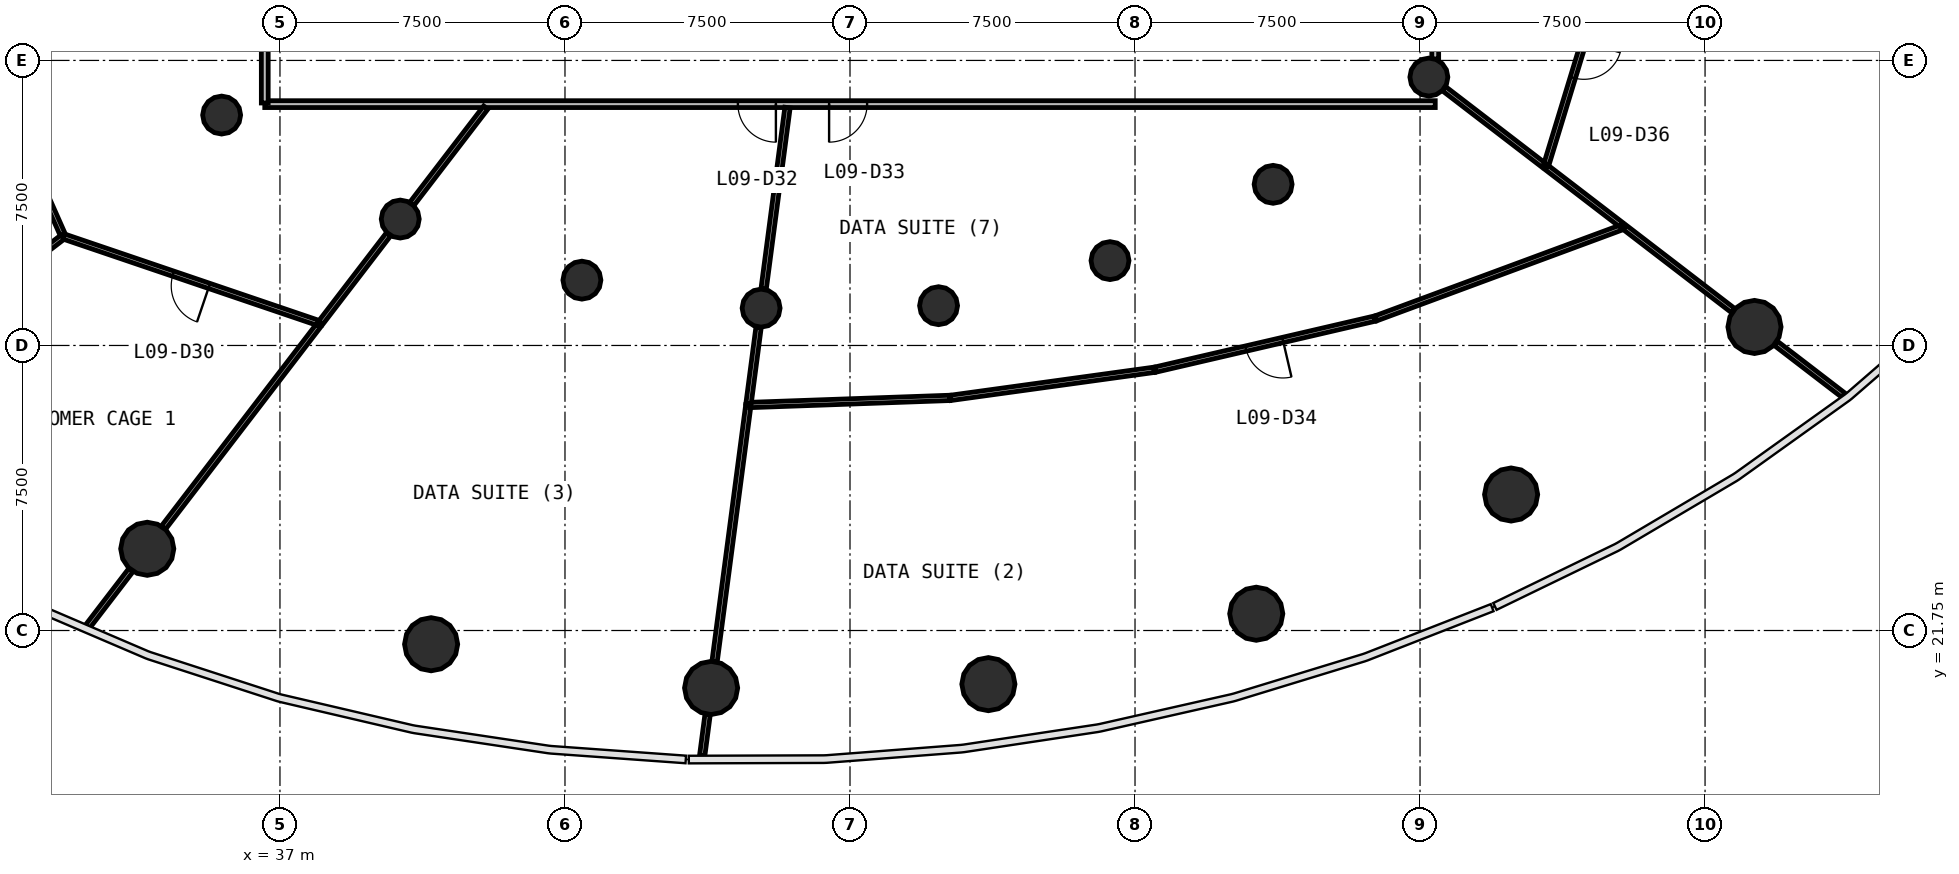
"""IFC4 building model, lengths in metres.
Left out: names, types, materials, properties, quantities, classifications, styles, units other than length and angle.
Written with IfcOpenShell. Run it as: python <this file> out.ifc"""

import sys

from ifc_helpers import new_model, si_unit, direction, frame, frame_2d, origin, origin_2d, place, context, subcontext, project, spatial, rectangle, circle, extrude, source, transform, mapped, element, fill, save


model = new_model("IFC4")
c1 = context("Model", 3, precision=1e-05, world=origin(), true_north=direction((0.0, 1.0)))
c2 = subcontext(c1, "Body", "Model", "MODEL_VIEW")
j1 = project(units=[si_unit("LENGTHUNIT", "METRE"), si_unit("PLANEANGLEUNIT", "RADIAN")], contexts=[c1])
p1 = place(None, origin())
s1 = spatial("IfcSite", under=j1, at=p1, CompositionType="ELEMENT")
p2 = place(p1, origin())
s2 = spatial("IfcBuilding", under=s1, at=p2, CompositionType="ELEMENT")
p3 = place(p2, frame((0.0, 0.0, 40.2)))
s3 = spatial("IfcBuildingStorey", under=s2, at=p3, CompositionType="ELEMENT", Elevation=40.2)
m1 = source(origin(), c2, "Body", "SweptSolid", [
    extrude(circle(Radius=0.7, at=origin_2d()), origin(), (0.0, 0.0, 1.0), 4.4),
])
for number, where, z_axis, x_axis in (
    (1, (33.508, 23.9, 0.0), (0.0, 0.0, 1.0), (1.0, 0.0, 0.0)),
    (2, (40.977, 21.389, 0.0), (0.0, 0.0, 1.0), (1.0, 0.0, 0.0)),
    (3, (48.345, 20.239, 0.0), (0.0, 0.0, 1.0), (1.0, 0.0, 0.0)),
    (4, (55.642, 20.339, 0.0), (0.0, 0.0, 1.0), (1.0, 0.0, 0.0)),
    (5, (62.69, 22.191, 0.0), (0.0, 0.0, 1.0), (1.0, 0.0, 0.0)),
    (6, (69.396, 25.328, 0.0), (0.0, 0.0, 1.0), (1.0, 0.0, 0.0)),
    (7, (75.801, 29.737, 0.0), (0.0, 0.0, 1.0), (1.0, 0.0, 0.0)),
):
    element("IfcColumn", number, at=place(p3, frame(where, z_axis=z_axis, x_axis=x_axis)), inside=s3, PredefinedType="COLUMN", context=c2, shape_type="MappedRepresentation", body=[
        mapped(m1, transform((0.0, 0.0, 0.0), scale=1.0)),
    ])
m2 = source(origin(), c2, "Body", "SweptSolid", [
    extrude(circle(Radius=0.5, at=origin_2d()), origin(), (0.0, 0.0, 1.0), 4.4),
])
for number, where, z_axis, x_axis in (
    (8, (35.465, 35.312, 0.0), (0.0, 0.0, 1.0), (1.0, 0.0, 0.0)),
    (9, (40.165, 32.576, 0.0), (0.0, 0.0, 1.0), (1.0, 0.0, 0.0)),
    (10, (44.945, 30.969, 0.0), (0.0, 0.0, 1.0), (1.0, 0.0, 0.0)),
    (11, (49.661, 30.233, 0.0), (0.0, 0.0, 1.0), (1.0, 0.0, 0.0)),
    (12, (54.331, 30.297, 0.0), (0.0, 0.0, 1.0), (1.0, 0.0, 0.0)),
    (13, (58.842, 31.482, 0.0), (0.0, 0.0, 1.0), (1.0, 0.0, 0.0)),
    (14, (63.134, 33.49, 0.0), (0.0, 0.0, 1.0), (1.0, 0.0, 0.0)),
    (15, (67.232, 36.312, 0.0), (0.0, 0.0, 1.0), (1.0, 0.0, 0.0)),
):
    element("IfcColumn", number, at=place(p3, frame(where, z_axis=z_axis, x_axis=x_axis)), inside=s3, PredefinedType="COLUMN", context=c2, shape_type="MappedRepresentation", body=[
        mapped(m2, transform((0.0, 0.0, 0.0), scale=1.0)),
    ])
p4 = place(p3, frame((67.4, 35.6, 0.0), z_axis=(0.0, 0.0, 1.0), x_axis=(-1.0, 0.0, 0.0)))
e16 = element("IfcWall", 16, at=p4, inside=s3, PredefinedType="PARTITIONING", context=c2, shape_type="SweptSolid", body=[
    extrude(rectangle(XDim=30.8, YDim=0.18, at=frame_2d((15.4, 0.0))), origin(), (0.0, 0.0, 1.0), 3.05),
])
p5 = place(p4, frame((17.35, 0.0, 0.0)))
e17 = element("IfcOpeningElement", 17, at=p5, cuts=e16, PredefinedType="OPENING", context=c2, shape_type="SweptSolid", body=[
    extrude(rectangle(XDim=1.0, YDim=2.1, at=frame_2d((0.5, 1.05))), frame((0.0, 0.1, 0.0), z_axis=(0.0, -1.0, 0.0), x_axis=(1.0, 0.0, 0.0)), (0.0, 0.0, 1.0), 0.2),
])
p6 = place(p4, frame((14.95, 0.0, 0.0)))
e18 = element("IfcOpeningElement", 18, at=p6, cuts=e16, PredefinedType="OPENING", context=c2, shape_type="SweptSolid", body=[
    extrude(rectangle(XDim=1.0, YDim=2.1, at=frame_2d((0.5, 1.05))), frame((0.0, 0.1, 0.0), z_axis=(0.0, -1.0, 0.0), x_axis=(1.0, 0.0, 0.0)), (0.0, 0.0, 1.0), 0.2),
])
p7 = place(p3, frame((67.4, 60.37, 0.0), z_axis=(0.0, 0.0, 1.0), x_axis=(0.0, -1.0, 0.0)))
e19 = element("IfcWall", 19, at=p7, inside=s3, PredefinedType="PARTITIONING", context=c2, shape_type="SweptSolid", body=[
    extrude(rectangle(XDim=23.583, YDim=0.18, at=frame_2d((11.791, 0.0))), origin(), (0.0, 0.0, 1.0), 3.05),
])
p8 = place(p7, frame((11.333, 0.0, 0.0)))
e20 = element("IfcOpeningElement", 20, at=p8, cuts=e19, PredefinedType="OPENING", context=c2, shape_type="SweptSolid", body=[
    extrude(rectangle(XDim=1.0, YDim=2.1, at=frame_2d((0.5, 1.05))), frame((0.0, 0.1, 0.0), z_axis=(0.0, -1.0, 0.0), x_axis=(1.0, 0.0, 0.0)), (0.0, 0.0, 1.0), 0.2),
])
p9 = place(p3, frame((36.6, 35.63, 0.0), z_axis=(0.0, 0.0, 1.0), x_axis=(0.0, 1.0, 0.0)))
e21 = element("IfcWall", 21, at=p9, inside=s3, PredefinedType="PARTITIONING", context=c2, shape_type="SweptSolid", body=[
    extrude(rectangle(XDim=23.583, YDim=0.18, at=frame_2d((11.791, 0.0))), origin(), (0.0, 0.0, 1.0), 3.05),
])
p10 = place(p9, frame((16.032, 0.0, 0.0)))
e22 = element("IfcOpeningElement", 22, at=p10, cuts=e21, PredefinedType="OPENING", context=c2, shape_type="SweptSolid", body=[
    extrude(rectangle(XDim=0.9, YDim=2.1, at=frame_2d((0.45, 1.05))), frame((0.0, 0.1, 0.0), z_axis=(0.0, -1.0, 0.0), x_axis=(1.0, 0.0, 0.0)), (0.0, 0.0, 1.0), 0.2),
])
p11 = place(p9, frame((13.232, 0.0, 0.0)))
e23 = element("IfcOpeningElement", 23, at=p11, cuts=e21, PredefinedType="OPENING", context=c2, shape_type="SweptSolid", body=[
    extrude(rectangle(XDim=0.9, YDim=2.1, at=frame_2d((0.45, 1.05))), frame((0.0, 0.1, 0.0), z_axis=(0.0, -1.0, 0.0), x_axis=(1.0, 0.0, 0.0)), (0.0, 0.0, 1.0), 0.2),
])
p12 = place(p9, frame((11.433, 0.0, 0.0)))
e24 = element("IfcOpeningElement", 24, at=p12, cuts=e21, PredefinedType="OPENING", context=c2, shape_type="SweptSolid", body=[
    extrude(rectangle(XDim=0.9, YDim=2.1, at=frame_2d((0.45, 1.05))), frame((0.0, 0.1, 0.0), z_axis=(0.0, -1.0, 0.0), x_axis=(1.0, 0.0, 0.0)), (0.0, 0.0, 1.0), 0.2),
])
p13 = place(p9, frame((9.133, 0.0, 0.0)))
e25 = element("IfcOpeningElement", 25, at=p13, cuts=e21, PredefinedType="OPENING", context=c2, shape_type="SweptSolid", body=[
    extrude(rectangle(XDim=1.0, YDim=2.1, at=frame_2d((0.5, 1.05))), frame((0.0, 0.1, 0.0), z_axis=(0.0, -1.0, 0.0), x_axis=(1.0, 0.0, 0.0)), (0.0, 0.0, 1.0), 0.2),
])
p14 = place(p9, frame((19.133, 0.0, 0.0)))
e26 = element("IfcOpeningElement", 26, at=p14, cuts=e21, PredefinedType="OPENING", context=c2, shape_type="SweptSolid", body=[
    extrude(rectangle(XDim=1.0, YDim=2.1, at=frame_2d((0.5, 1.05))), frame((0.0, 0.1, 0.0), z_axis=(0.0, -1.0, 0.0), x_axis=(1.0, 0.0, 0.0)), (0.0, 0.0, 1.0), 0.2),
])
p15 = place(p3, frame((38.055, 29.826, 0.0), z_axis=(0.0, 0.0, 1.0), x_axis=(-0.946877260645, 0.321595169854, 0.0)))
e27 = element("IfcWall", 27, at=p15, inside=s3, PredefinedType="PARTITIONING", context=c2, shape_type="SweptSolid", body=[
    extrude(rectangle(XDim=7.13, YDim=0.14, at=frame_2d((3.565, 0.0))), origin(), (0.0, 0.0, 1.0), 3.05),
])
p16 = place(p15, frame((3.08, 0.0, 0.0)))
e28 = element("IfcOpeningElement", 28, at=p16, cuts=e27, PredefinedType="OPENING", context=c2, shape_type="SweptSolid", body=[
    extrude(rectangle(XDim=1.0, YDim=2.1, at=frame_2d((0.5, 1.05))), frame((0.0, 0.08, 0.0), z_axis=(0.0, -1.0, 0.0), x_axis=(1.0, 0.0, 0.0)), (0.0, 0.0, 1.0), 0.16),
])
p17 = place(p3, frame((65.84, 29.964, 0.0), z_axis=(0.0, 0.0, 1.0), x_axis=(0.937795770534, 0.347187402953, 0.0)))
e29 = element("IfcWall", 29, at=p17, inside=s3, PredefinedType="PARTITIONING", context=c2, shape_type="SweptSolid", body=[
    extrude(rectangle(XDim=6.952, YDim=0.14, at=frame_2d((3.476, 0.0))), origin(), (0.0, 0.0, 1.0), 3.05),
])
p18 = place(p3, frame((49.325, 27.683, 0.0), z_axis=(0.0, 0.0, 1.0), x_axis=(-0.130537120315, -0.991443422602, 0.0)))
e30 = element("IfcWall", 30, at=p18, inside=s3, PredefinedType="PARTITIONING", context=c2, shape_type="SweptSolid", body=[
    extrude(rectangle(XDim=6.804, YDim=0.14, at=frame_2d((3.402, 0.0))), origin(), (0.0, 0.0, 1.0), 3.05),
])
p19 = place(p3, frame((38.01, 29.768, 0.0), z_axis=(0.0, 0.0, 1.0), x_axis=(-0.608789949358, -0.793331455043, 0.0)))
e31 = element("IfcWall", 31, at=p19, inside=s3, PredefinedType="PARTITIONING", context=c2, shape_type="SweptSolid", body=[
    extrude(rectangle(XDim=6.691, YDim=0.14, at=frame_2d((3.346, 0.0))), origin(), (0.0, 0.0, 1.0), 3.05),
])
p20 = place(p3, frame((31.292, 32.146, 0.0), z_axis=(0.0, 0.0, 1.0), x_axis=(-0.40591511996, 0.913910780869, 0.0)))
e32 = element("IfcWall", 32, at=p20, inside=s3, PredefinedType="PARTITIONING", context=c2, shape_type="SweptSolid", body=[
    extrude(rectangle(XDim=6.694, YDim=0.14, at=frame_2d((3.347, 0.0))), origin(), (0.0, 0.0, 1.0), 3.05),
])
p21 = place(p20, frame((2.844, 0.0, 0.0)))
e33 = element("IfcOpeningElement", 33, at=p21, cuts=e32, PredefinedType="OPENING", context=c2, shape_type="SweptSolid", body=[
    extrude(rectangle(XDim=1.0, YDim=2.1, at=frame_2d((0.5, 1.05))), frame((0.0, 0.08, 0.0), z_axis=(0.0, -1.0, 0.0), x_axis=(1.0, 0.0, 0.0)), (0.0, 0.0, 1.0), 0.16),
])
p22 = place(p3, frame((72.056, 39.692, 0.0), z_axis=(0.0, 0.0, 1.0), x_axis=(-0.291746072941, -0.95649580706, 0.0)))
e34 = element("IfcWall", 34, at=p22, inside=s3, PredefinedType="PARTITIONING", context=c2, shape_type="SweptSolid", body=[
    extrude(rectangle(XDim=6.0, YDim=0.14, at=frame_2d((3.0, 0.0))), origin(), (0.0, 0.0, 1.0), 3.05),
])
p23 = place(p22, frame((2.55, 0.0, 0.0)))
e35 = element("IfcOpeningElement", 35, at=p23, cuts=e34, PredefinedType="OPENING", context=c2, shape_type="SweptSolid", body=[
    extrude(rectangle(XDim=1.0, YDim=2.1, at=frame_2d((0.5, 1.05))), frame((0.0, 0.08, 0.0), z_axis=(0.0, -1.0, 0.0), x_axis=(1.0, 0.0, 0.0)), (0.0, 0.0, 1.0), 0.16),
])
p24 = place(p3, frame((65.81, 29.957, 0.0), z_axis=(0.0, 0.0, 1.0), x_axis=(-0.974024489501, -0.226442694412, 0.0)))
e36 = element("IfcWall", 36, at=p24, inside=s3, PredefinedType="PARTITIONING", context=c2, shape_type="SweptSolid", body=[
    extrude(rectangle(XDim=5.934, YDim=0.14, at=frame_2d((2.967, 0.0))), origin(), (0.0, 0.0, 1.0), 3.05),
])
p25 = place(p24, frame((2.484, 0.0, 0.0)))
e37 = element("IfcOpeningElement", 37, at=p25, cuts=e36, PredefinedType="OPENING", context=c2, shape_type="SweptSolid", body=[
    extrude(rectangle(XDim=1.0, YDim=2.1, at=frame_2d((0.5, 1.05))), frame((0.0, 0.08, 0.0), z_axis=(0.0, -1.0, 0.0), x_axis=(1.0, 0.0, 0.0)), (0.0, 0.0, 1.0), 0.16),
])
p26 = place(p3, frame((31.28, 32.101, 0.0), z_axis=(0.0, 0.0, 1.0), x_axis=(-0.793356588495, -0.608757195844, 0.0)))
e38 = element("IfcWall", 38, at=p26, inside=s3, PredefinedType="PARTITIONING", context=c2, shape_type="SweptSolid", body=[
    extrude(rectangle(XDim=5.744, YDim=0.14, at=frame_2d((2.872, 0.0))), origin(), (0.0, 0.0, 1.0), 3.05),
])
p27 = place(p3, frame((54.65, 27.871, 0.0), z_axis=(0.0, 0.0, 1.0), x_axis=(0.990620496316, 0.13664198578, 0.0)))
e39 = element("IfcWall", 39, at=p27, inside=s3, PredefinedType="PARTITIONING", context=c2, shape_type="SweptSolid", body=[
    extrude(rectangle(XDim=5.401, YDim=0.14, at=frame_2d((2.701, 0.0))), origin(), (0.0, 0.0, 1.0), 3.05),
])
p28 = place(p3, frame((49.355, 27.684, 0.0), z_axis=(0.0, 0.0, 1.0), x_axis=(0.999371443886, 0.035450206555, 0.0)))
e40 = element("IfcWall", 40, at=p28, inside=s3, PredefinedType="PARTITIONING", context=c2, shape_type="SweptSolid", body=[
    extrude(rectangle(XDim=5.269, YDim=0.14, at=frame_2d((2.634, 0.0))), origin(), (0.0, 0.0, 1.0), 3.05),
])
p29 = place(p3, frame((50.356, 35.51, 0.0), z_axis=(0.0, 0.0, 1.0), x_axis=(-0.130523979823, -0.991445152639, 0.0)))
e41 = element("IfcWall", 41, at=p29, inside=s3, PredefinedType="PARTITIONING", context=c2, shape_type="SweptSolid", body=[
    extrude(rectangle(XDim=4.818, YDim=0.14, at=frame_2d((2.409, 0.0))), origin(), (0.0, 0.0, 1.0), 3.05),
])
p30 = place(p3, frame((72.383, 32.359, 0.0), z_axis=(0.0, 0.0, 1.0), x_axis=(0.793374011923, -0.608734488267, 0.0)))
e42 = element("IfcWall", 42, at=p30, inside=s3, PredefinedType="PARTITIONING", context=c2, shape_type="SweptSolid", body=[
    extrude(rectangle(XDim=3.603, YDim=0.14, at=frame_2d((1.802, 0.0))), origin(), (0.0, 0.0, 1.0), 3.05),
])
p31 = place(p3, frame((67.633, 36.005, 0.0), z_axis=(0.0, 0.0, 1.0), x_axis=(0.793345111692, -0.608772152579, 0.0)))
e43 = element("IfcWall", 43, at=p31, inside=s3, PredefinedType="PARTITIONING", context=c2, shape_type="SweptSolid", body=[
    extrude(rectangle(XDim=3.295, YDim=0.14, at=frame_2d((1.647, 0.0))), origin(), (0.0, 0.0, 1.0), 3.05),
])
p32 = place(p3, frame((42.416, 35.51, 0.0), z_axis=(0.0, 0.0, 1.0), x_axis=(-0.60874605662, -0.793365135703, 0.0)))
e44 = element("IfcWall", 44, at=p32, inside=s3, PredefinedType="PARTITIONING", context=c2, shape_type="SweptSolid", body=[
    extrude(rectangle(XDim=3.194, YDim=0.14, at=frame_2d((1.597, 0.0))), origin(), (0.0, 0.0, 1.0), 3.05),
])
p33 = place(p3, frame((39.858, 32.176, 0.0), z_axis=(0.0, 0.0, 1.0), x_axis=(-0.608796847525, -0.793326161452, 0.0)))
e45 = element("IfcWall", 45, at=p33, inside=s3, PredefinedType="PARTITIONING", context=c2, shape_type="SweptSolid", body=[
    extrude(rectangle(XDim=2.932, YDim=0.14, at=frame_2d((1.466, 0.0))), origin(), (0.0, 0.0, 1.0), 3.05),
])
p34 = place(p3, frame((70.33, 33.935, 0.0), z_axis=(0.0, 0.0, 1.0), x_axis=(0.793360275681, -0.608752390526, 0.0)))
e46 = element("IfcWall", 46, at=p34, inside=s3, PredefinedType="PARTITIONING", context=c2, shape_type="SweptSolid", body=[
    extrude(rectangle(XDim=2.476, YDim=0.14, at=frame_2d((1.238, 0.0))), origin(), (0.0, 0.0, 1.0), 3.05),
])
p35 = place(p3, frame((76.359, 29.309, 0.0), z_axis=(0.0, 0.0, 1.0), x_axis=(0.793298337488, -0.608833103353, 0.0)))
e47 = element("IfcWall", 47, at=p35, inside=s3, PredefinedType="PARTITIONING", context=c2, shape_type="SweptSolid", body=[
    extrude(rectangle(XDim=2.246, YDim=0.14, at=frame_2d((1.123, 0.0))), origin(), (0.0, 0.0, 1.0), 3.05),
])
p36 = place(p3, frame((49.595, 29.733, 0.0), z_axis=(0.0, 0.0, 1.0), x_axis=(-0.130476207722, -0.991451440676, 0.0)))
e48 = element("IfcWall", 48, at=p36, inside=s3, PredefinedType="PARTITIONING", context=c2, shape_type="SweptSolid", body=[
    extrude(rectangle(XDim=2.038, YDim=0.14, at=frame_2d((1.019, 0.0))), origin(), (0.0, 0.0, 1.0), 3.05),
])
p37 = place(p3, frame((33.079, 23.342, 0.0), z_axis=(0.0, 0.0, 1.0), x_axis=(-0.608792119063, -0.793329790041, 0.0)))
e49 = element("IfcWall", 49, at=p37, inside=s3, PredefinedType="PARTITIONING", context=c2, shape_type="SweptSolid", body=[
    extrude(rectangle(XDim=1.876, YDim=0.14, at=frame_2d((0.938, 0.0))), origin(), (0.0, 0.0, 1.0), 3.05),
])
p38 = place(p3, frame((48.253, 19.54, 0.0), z_axis=(0.0, 0.0, 1.0), x_axis=(-0.130414214124, -0.991459597137, 0.0)))
e50 = element("IfcWall", 50, at=p38, inside=s3, PredefinedType="PARTITIONING", context=c2, shape_type="SweptSolid", body=[
    extrude(rectangle(XDim=1.097, YDim=0.14, at=frame_2d((0.548, 0.0))), origin(), (0.0, 0.0, 1.0), 3.05),
])
m3 = source(origin(), c2, "Body", "SweptSolid", [
    extrude(rectangle(XDim=1.0, YDim=2.1, at=frame_2d((0.5, 1.05))), frame((0.0, 0.025, 0.0), z_axis=(0.0, -1.0, 0.0), x_axis=(1.0, 0.0, 0.0)), (0.0, 0.0, 1.0), 0.05),
])
p39 = place(p16, origin())
e51 = element("IfcDoor", 51, at=p39, inside=s3, OperationType="SINGLE_SWING_LEFT", PredefinedType="DOOR", context=c2, shape_type="MappedRepresentation", body=[
    mapped(m3, transform((0.0, 0.0, 0.0), scale=1.0)),
])
fill(e28, e51)
p40 = place(p5, origin())
e52 = element("IfcDoor", 52, at=p40, inside=s3, OperationType="SINGLE_SWING_LEFT", PredefinedType="DOOR", context=c2, shape_type="MappedRepresentation", body=[
    mapped(m3, transform((0.0, 0.0, 0.0), scale=1.0)),
])
fill(e17, e52)
p41 = place(p6, origin())
e53 = element("IfcDoor", 53, at=p41, inside=s3, OperationType="SINGLE_SWING_RIGHT", PredefinedType="DOOR", context=c2, shape_type="MappedRepresentation", body=[
    mapped(m3, transform((0.0, 0.0, 0.0), scale=1.0)),
])
fill(e18, e53)
p42 = place(p25, origin())
e54 = element("IfcDoor", 54, at=p42, inside=s3, OperationType="SINGLE_SWING_LEFT", PredefinedType="DOOR", context=c2, shape_type="MappedRepresentation", body=[
    mapped(m3, transform((0.0, 0.0, 0.0), scale=1.0)),
])
fill(e37, e54)
p43 = place(p23, origin())
e55 = element("IfcDoor", 55, at=p43, inside=s3, OperationType="SINGLE_SWING_LEFT", PredefinedType="DOOR", context=c2, shape_type="MappedRepresentation", body=[
    mapped(m3, transform((0.0, 0.0, 0.0), scale=1.0)),
])
fill(e35, e55)
save(model, sys.argv[1])
